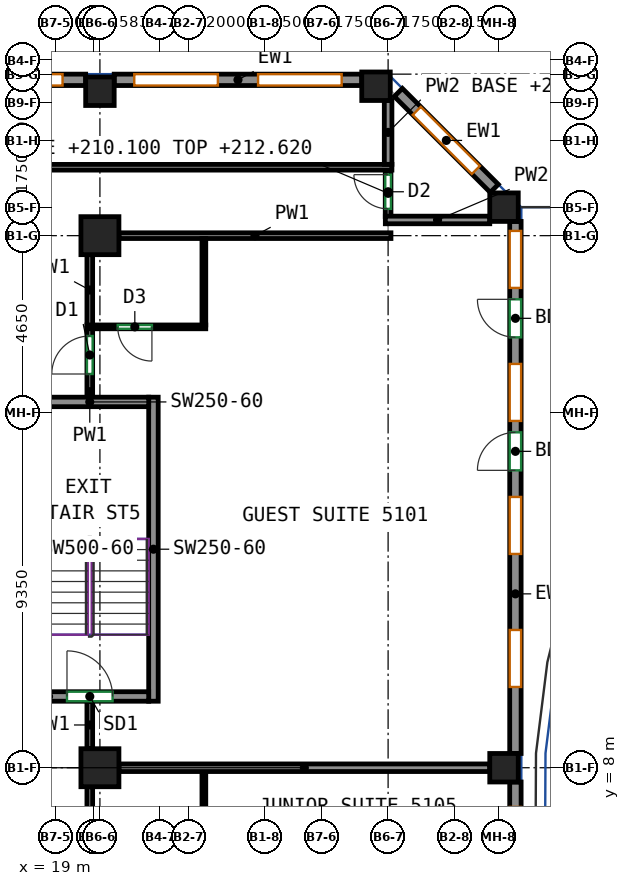
"""IFC4 building model, lengths in metres.
Left out: names, types, materials, properties, quantities, classifications, styles, units other than length and angle.
Written with IfcOpenShell. Run it as: python <this file> out.ifc"""

import sys

from ifc_helpers import new_model, si_unit, direction, frame, frame_2d, origin, origin_2d, place, context, subcontext, project, spatial, rectangle, extrude, source, transform, mapped, element, fill, save


model = new_model("IFC4")
c1 = context("Model", 3, precision=1e-05, world=origin(), true_north=direction((0.0, 1.0)))
c2 = subcontext(c1, "Body", "Model", "MODEL_VIEW")
j1 = project(units=[si_unit("LENGTHUNIT", "METRE"), si_unit("PLANEANGLEUNIT", "RADIAN")], contexts=[c1])
p1 = place(None, origin())
s1 = spatial("IfcSite", under=j1, at=p1, CompositionType="ELEMENT")
p2 = place(p1, origin())
s2 = spatial("IfcBuilding", under=s1, at=p2, CompositionType="ELEMENT")
p3 = place(p2, frame((0.0, 0.0, 210.1)))
s3 = spatial("IfcBuildingStorey", under=s2, at=p3, CompositionType="ELEMENT", Elevation=210.1)
m1 = source(origin(), c2, "Body", "SweptSolid", [
    extrude(rectangle(XDim=1.0, YDim=1.0, at=origin_2d()), origin(), (0.0, 0.0, 1.0), 3.12),
])
for number, where, z_axis, x_axis in (
    (1, (20.167, 8.0, 0.0), (0.0, 0.0, 1.0), (1.0, 0.0, 0.0)),
    (2, (20.167, 22.0, 0.0), (0.0, 0.0, 1.0), (1.0, 0.0, 0.0)),
):
    element("IfcColumn", number, at=place(p3, frame(where, z_axis=z_axis, x_axis=x_axis)), inside=s3, PredefinedType="COLUMN", context=c2, shape_type="MappedRepresentation", body=[
        mapped(m1, transform((0.0, 0.0, 0.0))),
    ])
m2 = source(origin(), c2, "Body", "SweptSolid", [
    extrude(rectangle(XDim=0.75, YDim=0.75, at=origin_2d()), origin(), (0.0, 0.0, 1.0), 3.12),
])
for number, where, z_axis, x_axis in (
    (3, (20.167, 25.8, 0.0), (0.0, 0.0, 1.0), (1.0, 0.0, 0.0)),
    (4, (27.432, 25.932, 0.0), (0.0, 0.0, 1.0), (1.0, 0.0, 0.0)),
    (5, (30.8, 8.0, 0.0), (0.0, 0.0, 1.0), (1.0, 0.0, 0.0)),
    (6, (30.8, 22.75, 0.0), (0.0, 0.0, 1.0), (1.0, 0.0, 0.0)),
):
    element("IfcColumn", number, at=place(p3, frame(where, z_axis=z_axis, x_axis=x_axis)), inside=s3, PredefinedType="COLUMN", context=c2, shape_type="MappedRepresentation", body=[
        mapped(m2, transform((0.0, 0.0, 0.0))),
    ])
m3 = source(origin(), c2, "Body", "SweptSolid", [
    extrude(rectangle(XDim=8.0, YDim=0.25, at=frame_2d((4.0, 0.0))), origin(), (0.0, 0.0, 1.0), 3.12),
])
p4 = place(p3, frame((21.575, 9.75, 0.0), z_axis=(0.0, 0.0, 1.0), x_axis=(0.0, 1.0, 0.0)))
e7 = element("IfcWall", 7, at=p4, inside=s3, PredefinedType="SHEAR", context=c2, shape_type="MappedRepresentation", body=[
    mapped(m3, transform((0.0, 0.0, 0.0))),
])
m4 = source(origin(), c2, "Body", "SweptSolid", [
    extrude(rectangle(XDim=3.1, YDim=0.25, at=frame_2d((1.55, 0.0))), origin(), (0.0, 0.0, 1.0), 3.12),
])
p5 = place(p3, frame((18.35, 9.875, 0.0), z_axis=(0.0, 0.0, 1.0), x_axis=(1.0, 0.0, 0.0)))
e8 = element("IfcWall", 8, at=p5, inside=s3, PredefinedType="SHEAR", context=c2, shape_type="MappedRepresentation", body=[
    mapped(m4, transform((0.0, 0.0, 0.0))),
])
p6 = place(p5, frame((0.95, 0.0, 0.0)))
e9 = element("IfcOpeningElement", 9, at=p6, cuts=e8, PredefinedType="OPENING", context=c2, shape_type="SweptSolid", body=[
    extrude(rectangle(XDim=1.2, YDim=2.1, at=frame_2d((0.6, 1.05))), frame((0.0, 0.135, 0.0), z_axis=(0.0, -1.0, 0.0), x_axis=(1.0, 0.0, 0.0)), (0.0, 0.0, 1.0), 0.27),
])
p7 = place(p3, frame((18.35, 17.625, 0.0), z_axis=(0.0, 0.0, 1.0), x_axis=(1.0, 0.0, 0.0)))
e10 = element("IfcWall", 10, at=p7, inside=s3, PredefinedType="SHEAR", context=c2, shape_type="MappedRepresentation", body=[
    mapped(m4, transform((0.0, 0.0, 0.0))),
])
m5 = source(origin(), c2, "Body", "SweptSolid", [
    extrude(rectangle(XDim=7.812, YDim=0.3, at=frame_2d((3.906, 0.0))), origin(), (0.0, 0.0, 1.0), 3.12),
])
p8 = place(p3, frame((31.1, -0.188, 0.0), z_axis=(0.0, 0.0, 1.0), x_axis=(0.0, 1.0, 0.0)))
e11 = element("IfcWall", 11, at=p8, inside=s3, PredefinedType="SOLIDWALL", context=c2, shape_type="MappedRepresentation", body=[
    mapped(m5, transform((0.0, 0.0, 0.0))),
])
p9 = place(p8, frame((1.75, 0.0, 0.85)))
e12 = element("IfcOpeningElement", 12, at=p9, cuts=e11, PredefinedType="OPENING", context=c2, shape_type="SweptSolid", body=[
    extrude(rectangle(XDim=1.5, YDim=1.95, at=frame_2d((0.75, 0.975))), frame((0.0, 0.16, 0.0), z_axis=(0.0, -1.0, 0.0), x_axis=(1.0, 0.0, 0.0)), (0.0, 0.0, 1.0), 0.32),
])
p10 = place(p8, frame((5.656, 0.0, 0.85)))
e13 = element("IfcOpeningElement", 13, at=p10, cuts=e11, PredefinedType="OPENING", context=c2, shape_type="SweptSolid", body=[
    extrude(rectangle(XDim=1.5, YDim=1.95, at=frame_2d((0.75, 0.975))), frame((0.0, 0.16, 0.0), z_axis=(0.0, -1.0, 0.0), x_axis=(1.0, 0.0, 0.0)), (0.0, 0.0, 1.0), 0.32),
])
m6 = source(origin(), c2, "Body", "SweptSolid", [
    extrude(rectangle(XDim=14.0, YDim=0.3, at=frame_2d((7.0, 0.0))), origin(), (0.0, 0.0, 1.0), 3.12),
])
p11 = place(p3, frame((31.1, 8.375, 0.0), z_axis=(0.0, 0.0, 1.0), x_axis=(0.0, 1.0, 0.0)))
e14 = element("IfcWall", 14, at=p11, inside=s3, PredefinedType="SOLIDWALL", context=c2, shape_type="MappedRepresentation", body=[
    mapped(m6, transform((0.0, 0.0, 0.0))),
])
p12 = place(p11, frame((1.75, 0.0, 0.85)))
e15 = element("IfcOpeningElement", 15, at=p12, cuts=e14, PredefinedType="OPENING", context=c2, shape_type="SweptSolid", body=[
    extrude(rectangle(XDim=1.5, YDim=1.95, at=frame_2d((0.75, 0.975))), frame((0.0, 0.16, 0.0), z_axis=(0.0, -1.0, 0.0), x_axis=(1.0, 0.0, 0.0)), (0.0, 0.0, 1.0), 0.32),
])
p13 = place(p11, frame((5.25, 0.0, 0.85)))
e16 = element("IfcOpeningElement", 16, at=p13, cuts=e14, PredefinedType="OPENING", context=c2, shape_type="SweptSolid", body=[
    extrude(rectangle(XDim=1.5, YDim=1.95, at=frame_2d((0.75, 0.975))), frame((0.0, 0.16, 0.0), z_axis=(0.0, -1.0, 0.0), x_axis=(1.0, 0.0, 0.0)), (0.0, 0.0, 1.0), 0.32),
])
p14 = place(p11, frame((8.75, 0.0, 0.85)))
e17 = element("IfcOpeningElement", 17, at=p14, cuts=e14, PredefinedType="OPENING", context=c2, shape_type="SweptSolid", body=[
    extrude(rectangle(XDim=1.5, YDim=1.95, at=frame_2d((0.75, 0.975))), frame((0.0, 0.16, 0.0), z_axis=(0.0, -1.0, 0.0), x_axis=(1.0, 0.0, 0.0)), (0.0, 0.0, 1.0), 0.32),
])
p15 = place(p11, frame((7.45, 0.0, 0.0)))
e18 = element("IfcOpeningElement", 18, at=p15, cuts=e14, PredefinedType="OPENING", context=c2, shape_type="SweptSolid", body=[
    extrude(rectangle(XDim=1.0, YDim=2.1, at=frame_2d((0.5, 1.05))), frame((0.0, 0.16, 0.0), z_axis=(0.0, -1.0, 0.0), x_axis=(1.0, 0.0, 0.0)), (0.0, 0.0, 1.0), 0.32),
])
p16 = place(p11, frame((12.25, 0.0, 0.85)))
e19 = element("IfcOpeningElement", 19, at=p16, cuts=e14, PredefinedType="OPENING", context=c2, shape_type="SweptSolid", body=[
    extrude(rectangle(XDim=1.5, YDim=1.95, at=frame_2d((0.75, 0.975))), frame((0.0, 0.16, 0.0), z_axis=(0.0, -1.0, 0.0), x_axis=(1.0, 0.0, 0.0)), (0.0, 0.0, 1.0), 0.32),
])
p17 = place(p11, frame((10.95, 0.0, 0.0)))
e20 = element("IfcOpeningElement", 20, at=p17, cuts=e14, PredefinedType="OPENING", context=c2, shape_type="SweptSolid", body=[
    extrude(rectangle(XDim=1.0, YDim=2.1, at=frame_2d((0.5, 1.05))), frame((0.0, 0.16, 0.0), z_axis=(0.0, -1.0, 0.0), x_axis=(1.0, 0.0, 0.0)), (0.0, 0.0, 1.0), 0.32),
])
m7 = source(origin(), c2, "Body", "SweptSolid", [
    extrude(rectangle(XDim=3.571, YDim=0.3, at=frame_2d((1.786, 0.0))), origin(), (0.0, 0.0, 1.0), 3.12),
])
p18 = place(p3, frame((30.544, 23.244, 0.0), z_axis=(0.0, 0.0, 1.0), x_axis=(-0.707140964879, 0.707072595841, 0.0)))
e21 = element("IfcWall", 21, at=p18, inside=s3, PredefinedType="SOLIDWALL", context=c2, shape_type="MappedRepresentation", body=[
    mapped(m7, transform((0.0, 0.0, 0.0))),
])
p19 = place(p18, frame((0.686, 0.0, 0.85)))
e22 = element("IfcOpeningElement", 22, at=p19, cuts=e21, PredefinedType="OPENING", context=c2, shape_type="SweptSolid", body=[
    extrude(rectangle(XDim=2.2, YDim=1.95, at=frame_2d((1.1, 0.975))), frame((0.0, 0.16, 0.0), z_axis=(0.0, -1.0, 0.0), x_axis=(1.0, 0.0, 0.0)), (0.0, 0.0, 1.0), 0.32),
])
m8 = source(origin(), c2, "Body", "SweptSolid", [
    extrude(rectangle(XDim=6.515, YDim=0.3, at=frame_2d((3.258, 0.0))), origin(), (0.0, 0.0, 1.0), 3.12),
])
p20 = place(p3, frame((27.057, 26.1, 0.0), z_axis=(0.0, 0.0, 1.0), x_axis=(-1.0, 0.0, 0.0)))
e23 = element("IfcWall", 23, at=p20, inside=s3, PredefinedType="SOLIDWALL", context=c2, shape_type="MappedRepresentation", body=[
    mapped(m8, transform((0.0, 0.0, 0.0))),
])
p21 = place(p20, frame((0.529, 0.0, 0.85)))
e24 = element("IfcOpeningElement", 24, at=p21, cuts=e23, PredefinedType="OPENING", context=c2, shape_type="SweptSolid", body=[
    extrude(rectangle(XDim=2.2, YDim=1.95, at=frame_2d((1.1, 0.975))), frame((0.0, 0.16, 0.0), z_axis=(0.0, -1.0, 0.0), x_axis=(1.0, 0.0, 0.0)), (0.0, 0.0, 1.0), 0.32),
])
p22 = place(p20, frame((3.786, 0.0, 0.85)))
e25 = element("IfcOpeningElement", 25, at=p22, cuts=e23, PredefinedType="OPENING", context=c2, shape_type="SweptSolid", body=[
    extrude(rectangle(XDim=2.2, YDim=1.95, at=frame_2d((1.1, 0.975))), frame((0.0, 0.16, 0.0), z_axis=(0.0, -1.0, 0.0), x_axis=(1.0, 0.0, 0.0)), (0.0, 0.0, 1.0), 0.32),
])
m9 = source(origin(), c2, "Body", "SweptSolid", [
    extrude(rectangle(XDim=6.833, YDim=0.3, at=frame_2d((3.417, 0.0))), origin(), (0.0, 0.0, 1.0), 3.12),
])
p23 = place(p3, frame((19.792, 26.1, 0.0), z_axis=(0.0, 0.0, 1.0), x_axis=(-1.0, 0.0, 0.0)))
e26 = element("IfcWall", 26, at=p23, inside=s3, PredefinedType="SOLIDWALL", context=c2, shape_type="MappedRepresentation", body=[
    mapped(m9, transform((0.0, 0.0, 0.0))),
])
p24 = place(p23, frame((0.608, 0.0, 0.85)))
e27 = element("IfcOpeningElement", 27, at=p24, cuts=e26, PredefinedType="OPENING", context=c2, shape_type="SweptSolid", body=[
    extrude(rectangle(XDim=2.2, YDim=1.95, at=frame_2d((1.1, 0.975))), frame((0.0, 0.16, 0.0), z_axis=(0.0, -1.0, 0.0), x_axis=(1.0, 0.0, 0.0)), (0.0, 0.0, 1.0), 0.32),
])
p25 = place(p23, frame((4.025, 0.0, 0.85)))
e28 = element("IfcOpeningElement", 28, at=p25, cuts=e26, PredefinedType="OPENING", context=c2, shape_type="SweptSolid", body=[
    extrude(rectangle(XDim=2.2, YDim=1.95, at=frame_2d((1.1, 0.975))), frame((0.0, 0.16, 0.0), z_axis=(0.0, -1.0, 0.0), x_axis=(1.0, 0.0, 0.0)), (0.0, 0.0, 1.0), 0.32),
])
p26 = place(p3, frame((19.9, 5.64, 0.0), z_axis=(0.0, 0.0, 1.0), x_axis=(0.0, 1.0, 0.0)))
e29 = element("IfcWall", 29, at=p26, inside=s3, PredefinedType="PARTITIONING", context=c2, shape_type="SweptSolid", body=[
    extrude(rectangle(XDim=1.86, YDim=0.15, at=frame_2d((0.93, 0.0))), origin(), (0.0, 0.0, 1.0), 2.52),
])
p27 = place(p3, frame((19.9, 17.75, 0.0), z_axis=(0.0, 0.0, 1.0), x_axis=(0.0, 1.0, 0.0)))
e30 = element("IfcWall", 30, at=p27, inside=s3, PredefinedType="PARTITIONING", context=c2, shape_type="SweptSolid", body=[
    extrude(rectangle(XDim=1.81, YDim=0.15, at=frame_2d((0.905, 0.0))), origin(), (0.0, 0.0, 1.0), 3.12),
])
p28 = place(p27, frame((0.61, 0.0, 0.0)))
e31 = element("IfcOpeningElement", 31, at=p28, cuts=e30, PredefinedType="OPENING", context=c2, shape_type="SweptSolid", body=[
    extrude(rectangle(XDim=1.0, YDim=2.1, at=frame_2d((0.5, 1.05))), frame((0.0, 0.085, 0.0), z_axis=(0.0, -1.0, 0.0), x_axis=(1.0, 0.0, 0.0)), (0.0, 0.0, 1.0), 0.17),
])
p29 = place(p3, frame((19.9, 8.5, 0.0), z_axis=(0.0, 0.0, 1.0), x_axis=(0.0, 1.0, 0.0)))
e32 = element("IfcWall", 32, at=p29, inside=s3, PredefinedType="PARTITIONING", context=c2, shape_type="SweptSolid", body=[
    extrude(rectangle(XDim=1.25, YDim=0.15, at=frame_2d((0.625, 0.0))), origin(), (0.0, 0.0, 1.0), 3.12),
])
p30 = place(p3, frame((20.667, 22.0, 0.0), z_axis=(0.0, 0.0, 1.0), x_axis=(1.0, 0.0, 0.0)))
e33 = element("IfcWall", 33, at=p30, inside=s3, PredefinedType="PARTITIONING", context=c2, shape_type="SweptSolid", body=[
    extrude(rectangle(XDim=7.158, YDim=0.15, at=frame_2d((3.579, 0.0))), origin(), (0.0, 0.0, 1.0), 3.12),
])
p31 = place(p3, frame((19.9, 19.64, 0.0), z_axis=(0.0, 0.0, 1.0), x_axis=(0.0, 1.0, 0.0)))
e34 = element("IfcWall", 34, at=p31, inside=s3, PredefinedType="PARTITIONING", context=c2, shape_type="SweptSolid", body=[
    extrude(rectangle(XDim=1.86, YDim=0.15, at=frame_2d((0.93, 0.0))), origin(), (0.0, 0.0, 1.0), 3.12),
])
p32 = place(p3, frame((27.75, 22.503, 0.0), z_axis=(0.0, 0.0, 1.0), x_axis=(0.0, 1.0, 0.0)))
e35 = element("IfcWall", 35, at=p32, inside=s3, PredefinedType="PARTITIONING", context=c2, shape_type="SweptSolid", body=[
    extrude(rectangle(XDim=1.222, YDim=0.15, at=frame_2d((0.611, 0.0))), origin(), (0.0, 0.0, 1.0), 2.52),
])
p33 = place(p32, frame((0.202, 0.0, 0.0)))
e36 = element("IfcOpeningElement", 36, at=p33, cuts=e35, PredefinedType="OPENING", context=c2, shape_type="SweptSolid", body=[
    extrude(rectangle(XDim=0.9, YDim=2.1, at=frame_2d((0.45, 1.05))), frame((0.0, 0.085, 0.0), z_axis=(0.0, -1.0, 0.0), x_axis=(1.0, 0.0, 0.0)), (0.0, 0.0, 1.0), 0.17),
])
p34 = place(p3, frame((27.85, 23.8, 0.0), z_axis=(0.0, 0.0, 1.0), x_axis=(-1.0, 0.0, 0.0)))
e37 = element("IfcWall", 37, at=p34, inside=s3, PredefinedType="PARTITIONING", context=c2, shape_type="SweptSolid", body=[
    extrude(rectangle(XDim=45.7, YDim=0.15, at=frame_2d((22.85, 0.0))), origin(), (0.0, 0.0, 1.0), 3.12),
])
p35 = place(p34, frame((16.838, 0.0, 0.0)))
e38 = element("IfcOpeningElement", 38, at=p35, cuts=e37, PredefinedType="OPENING", context=c2, shape_type="SweptSolid", body=[
    extrude(rectangle(XDim=1.0, YDim=2.1, at=frame_2d((0.5, 1.05))), frame((0.0, 0.085, 0.0), z_axis=(0.0, -1.0, 0.0), x_axis=(1.0, 0.0, 0.0)), (0.0, 0.0, 1.0), 0.17),
])
p36 = place(p3, frame((22.902, 5.65, 0.0), z_axis=(0.0, 0.0, 1.0), x_axis=(0.0, 1.0, 0.0)))
e39 = element("IfcWall", 39, at=p36, inside=s3, PredefinedType="PARTITIONING", context=c2, shape_type="SweptSolid", body=[
    extrude(rectangle(XDim=2.25, YDim=0.1, at=frame_2d((1.125, 0.0))), origin(), (0.0, 0.0, 1.0), 3.12),
])
p37 = place(p3, frame((20.667, 8.0, 0.0), z_axis=(0.0, 0.0, 1.0), x_axis=(1.0, 0.0, 0.0)))
e40 = element("IfcWall", 40, at=p37, inside=s3, PredefinedType="PARTITIONING", context=c2, shape_type="SweptSolid", body=[
    extrude(rectangle(XDim=9.758, YDim=0.2, at=frame_2d((4.879, 0.0))), origin(), (0.0, 0.0, 1.0), 2.52),
])
p38 = place(p3, frame((22.952, 19.6, 0.0), z_axis=(0.0, 0.0, 1.0), x_axis=(-1.0, 0.0, 0.0)))
e41 = element("IfcWall", 41, at=p38, inside=s3, PredefinedType="PARTITIONING", context=c2, shape_type="SweptSolid", body=[
    extrude(rectangle(XDim=3.125, YDim=0.1, at=frame_2d((1.562, 0.0))), origin(), (0.0, 0.0, 1.0), 3.12),
])
p39 = place(p38, frame((1.417, 0.0, 0.0)))
e42 = element("IfcOpeningElement", 42, at=p39, cuts=e41, PredefinedType="OPENING", context=c2, shape_type="SweptSolid", body=[
    extrude(rectangle(XDim=0.9, YDim=2.1, at=frame_2d((0.45, 1.05))), frame((0.0, 0.06, 0.0), z_axis=(0.0, -1.0, 0.0), x_axis=(1.0, 0.0, 0.0)), (0.0, 0.0, 1.0), 0.12),
])
p40 = place(p3, frame((22.902, 19.65, 0.0), z_axis=(0.0, 0.0, 1.0), x_axis=(0.0, 1.0, 0.0)))
e43 = element("IfcWall", 43, at=p40, inside=s3, PredefinedType="PARTITIONING", context=c2, shape_type="SweptSolid", body=[
    extrude(rectangle(XDim=2.273, YDim=0.1, at=frame_2d((1.137, 0.0))), origin(), (0.0, 0.0, 1.0), 3.12),
])
p41 = place(p3, frame((30.425, 22.413, 0.0), z_axis=(0.0, 0.0, 1.0), x_axis=(-1.0, 0.0, 0.0)))
e44 = element("IfcWall", 44, at=p41, inside=s3, PredefinedType="PARTITIONING", context=c2, shape_type="SweptSolid", body=[
    extrude(rectangle(XDim=2.748, YDim=0.2, at=frame_2d((1.374, 0.0))), origin(), (0.0, 0.0, 1.0), 2.52),
])
p42 = place(p3, frame((27.75, 25.557, 0.0), z_axis=(0.0, 0.0, 1.0), x_axis=(0.0, -1.0, 0.0)))
e45 = element("IfcWall", 45, at=p42, inside=s3, PredefinedType="PARTITIONING", context=c2, shape_type="SweptSolid", body=[
    extrude(rectangle(XDim=1.68, YDim=0.2, at=frame_2d((0.84, 0.0))), origin(), (0.0, 0.0, 1.0), 2.52),
])
p43 = place(p12, origin())
e46 = element("IfcWindow", 46, at=p43, inside=s3, PartitioningType="SINGLE_PANEL", PredefinedType="WINDOW", context=c2, shape_type="SweptSolid", body=[
    extrude(rectangle(XDim=1.5, YDim=1.95, at=frame_2d((0.75, 0.975))), frame((0.0, 0.03, 0.0), z_axis=(0.0, -1.0, 0.0), x_axis=(1.0, 0.0, 0.0)), (0.0, 0.0, 1.0), 0.06),
])
fill(e15, e46)
p44 = place(p13, origin())
e47 = element("IfcWindow", 47, at=p44, inside=s3, PartitioningType="SINGLE_PANEL", PredefinedType="WINDOW", context=c2, shape_type="SweptSolid", body=[
    extrude(rectangle(XDim=1.5, YDim=1.95, at=frame_2d((0.75, 0.975))), frame((0.0, 0.03, 0.0), z_axis=(0.0, -1.0, 0.0), x_axis=(1.0, 0.0, 0.0)), (0.0, 0.0, 1.0), 0.06),
])
fill(e16, e47)
p45 = place(p14, origin())
e48 = element("IfcWindow", 48, at=p45, inside=s3, PartitioningType="SINGLE_PANEL", PredefinedType="WINDOW", context=c2, shape_type="SweptSolid", body=[
    extrude(rectangle(XDim=1.5, YDim=1.95, at=frame_2d((0.75, 0.975))), frame((0.0, 0.03, 0.0), z_axis=(0.0, -1.0, 0.0), x_axis=(1.0, 0.0, 0.0)), (0.0, 0.0, 1.0), 0.06),
])
fill(e17, e48)
p46 = place(p15, origin())
e49 = element("IfcDoor", 49, at=p46, inside=s3, OperationType="SINGLE_SWING_LEFT", PredefinedType="DOOR", context=c2, shape_type="SweptSolid", body=[
    extrude(rectangle(XDim=1.0, YDim=2.1, at=frame_2d((0.5, 1.05))), frame((0.0, 0.025, 0.0), z_axis=(0.0, -1.0, 0.0), x_axis=(1.0, 0.0, 0.0)), (0.0, 0.0, 1.0), 0.05),
])
fill(e18, e49)
p47 = place(p16, origin())
e50 = element("IfcWindow", 50, at=p47, inside=s3, PartitioningType="SINGLE_PANEL", PredefinedType="WINDOW", context=c2, shape_type="SweptSolid", body=[
    extrude(rectangle(XDim=1.5, YDim=1.95, at=frame_2d((0.75, 0.975))), frame((0.0, 0.03, 0.0), z_axis=(0.0, -1.0, 0.0), x_axis=(1.0, 0.0, 0.0)), (0.0, 0.0, 1.0), 0.06),
])
fill(e19, e50)
p48 = place(p17, origin())
e51 = element("IfcDoor", 51, at=p48, inside=s3, OperationType="SINGLE_SWING_RIGHT", PredefinedType="DOOR", context=c2, shape_type="SweptSolid", body=[
    extrude(rectangle(XDim=1.0, YDim=2.1, at=frame_2d((0.5, 1.05))), frame((0.0, 0.025, 0.0), z_axis=(0.0, -1.0, 0.0), x_axis=(1.0, 0.0, 0.0)), (0.0, 0.0, 1.0), 0.05),
])
fill(e20, e51)
p49 = place(p19, origin())
e52 = element("IfcWindow", 52, at=p49, inside=s3, PartitioningType="SINGLE_PANEL", PredefinedType="WINDOW", context=c2, shape_type="SweptSolid", body=[
    extrude(rectangle(XDim=2.2, YDim=1.95, at=frame_2d((1.1, 0.975))), frame((0.0, 0.03, 0.0), z_axis=(0.0, -1.0, 0.0), x_axis=(1.0, 0.0, 0.0)), (0.0, 0.0, 1.0), 0.06),
])
fill(e22, e52)
p50 = place(p21, origin())
e53 = element("IfcWindow", 53, at=p50, inside=s3, PartitioningType="SINGLE_PANEL", PredefinedType="WINDOW", context=c2, shape_type="SweptSolid", body=[
    extrude(rectangle(XDim=2.2, YDim=1.95, at=frame_2d((1.1, 0.975))), frame((0.0, 0.03, 0.0), z_axis=(0.0, -1.0, 0.0), x_axis=(1.0, 0.0, 0.0)), (0.0, 0.0, 1.0), 0.06),
])
fill(e24, e53)
p51 = place(p22, origin())
e54 = element("IfcWindow", 54, at=p51, inside=s3, PartitioningType="SINGLE_PANEL", PredefinedType="WINDOW", context=c2, shape_type="SweptSolid", body=[
    extrude(rectangle(XDim=2.2, YDim=1.95, at=frame_2d((1.1, 0.975))), frame((0.0, 0.03, 0.0), z_axis=(0.0, -1.0, 0.0), x_axis=(1.0, 0.0, 0.0)), (0.0, 0.0, 1.0), 0.06),
])
fill(e25, e54)
p52 = place(p24, origin())
e55 = element("IfcWindow", 55, at=p52, inside=s3, PartitioningType="SINGLE_PANEL", PredefinedType="WINDOW", context=c2, shape_type="SweptSolid", body=[
    extrude(rectangle(XDim=2.2, YDim=1.95, at=frame_2d((1.1, 0.975))), frame((0.0, 0.03, 0.0), z_axis=(0.0, -1.0, 0.0), x_axis=(1.0, 0.0, 0.0)), (0.0, 0.0, 1.0), 0.06),
])
fill(e27, e55)
p53 = place(p6, origin())
e56 = element("IfcDoor", 56, at=p53, inside=s3, OperationType="DOUBLE_DOOR_SINGLE_SWING", PredefinedType="DOOR", context=c2, shape_type="SweptSolid", body=[
    extrude(rectangle(XDim=1.2, YDim=2.1, at=frame_2d((0.6, 1.05))), frame((0.0, 0.025, 0.0), z_axis=(0.0, -1.0, 0.0), x_axis=(1.0, 0.0, 0.0)), (0.0, 0.0, 1.0), 0.05),
])
fill(e9, e56)
p54 = place(p28, origin())
e57 = element("IfcDoor", 57, at=p54, inside=s3, OperationType="SINGLE_SWING_LEFT", PredefinedType="DOOR", context=c2, shape_type="SweptSolid", body=[
    extrude(rectangle(XDim=1.0, YDim=2.1, at=frame_2d((0.5, 1.05))), frame((0.0, 0.025, 0.0), z_axis=(0.0, -1.0, 0.0), x_axis=(1.0, 0.0, 0.0)), (0.0, 0.0, 1.0), 0.05),
])
fill(e31, e57)
p55 = place(p39, origin())
e58 = element("IfcDoor", 58, at=p55, inside=s3, OperationType="SINGLE_SWING_LEFT", PredefinedType="DOOR", context=c2, shape_type="SweptSolid", body=[
    extrude(rectangle(XDim=0.9, YDim=2.1, at=frame_2d((0.45, 1.05))), frame((0.0, 0.025, 0.0), z_axis=(0.0, -1.0, 0.0), x_axis=(1.0, 0.0, 0.0)), (0.0, 0.0, 1.0), 0.05),
])
fill(e42, e58)
p56 = place(p33, origin())
e59 = element("IfcDoor", 59, at=p56, inside=s3, OperationType="SINGLE_SWING_RIGHT", PredefinedType="DOOR", context=c2, shape_type="SweptSolid", body=[
    extrude(rectangle(XDim=0.9, YDim=2.1, at=frame_2d((0.45, 1.05))), frame((0.0, 0.025, 0.0), z_axis=(0.0, -1.0, 0.0), x_axis=(1.0, 0.0, 0.0)), (0.0, 0.0, 1.0), 0.05),
])
fill(e36, e59)
save(model, sys.argv[1])
